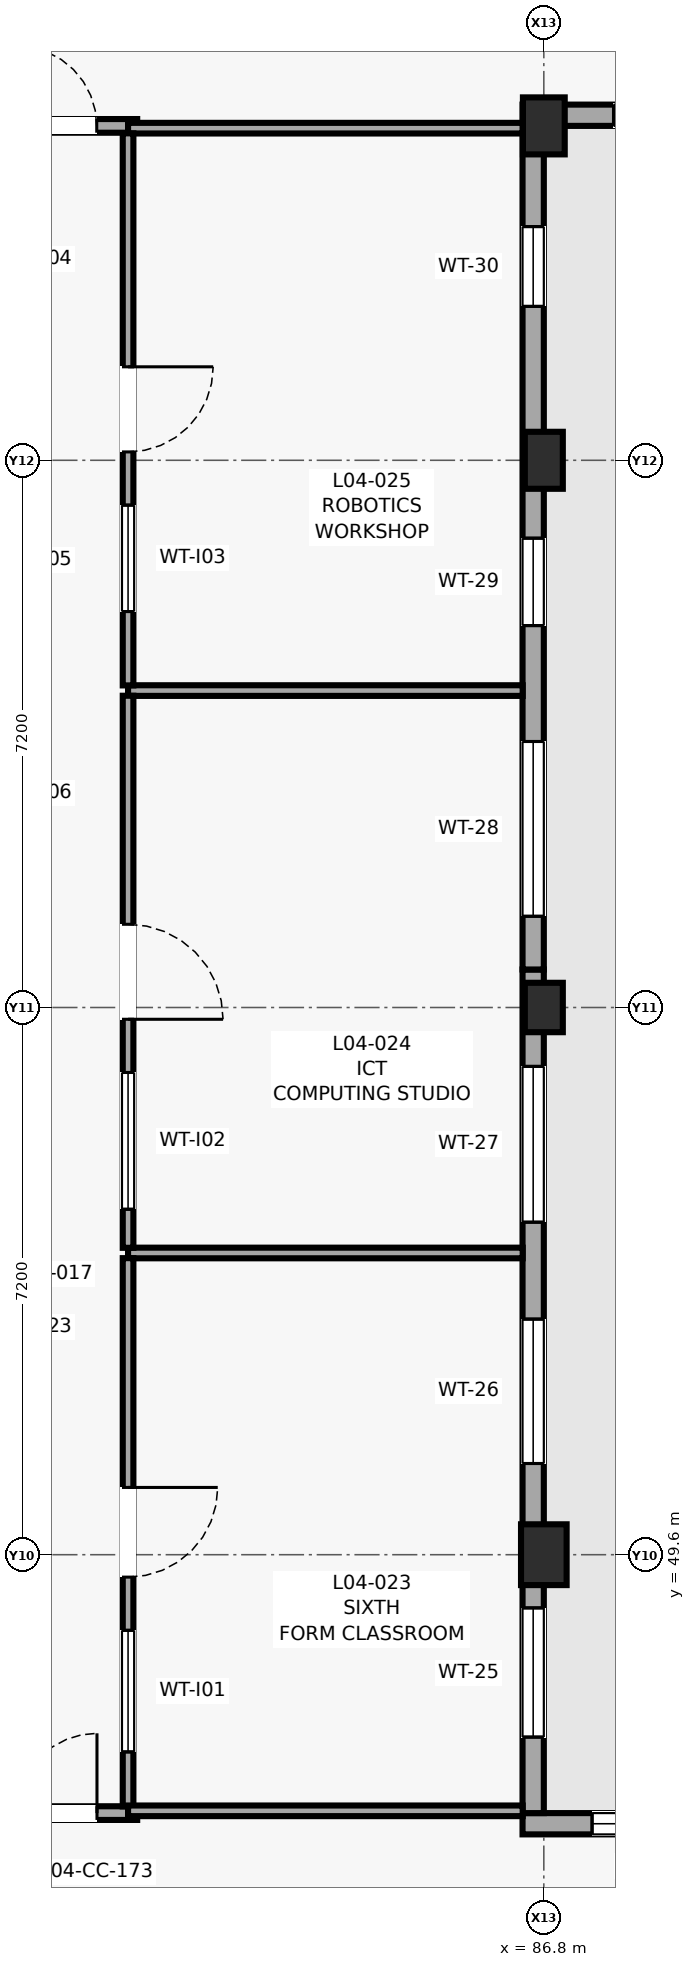
"""IFC4 building model, lengths in metres.
Left out: names, types, materials, properties, quantities, classifications, styles, units other than length and angle.
Written with IfcOpenShell. Run it as: python <this file> out.ifc"""

import sys

from ifc_helpers import new_model, si_unit, direction, frame, frame_2d, origin, origin_2d, place, context, subcontext, project, spatial, rectangle, extrude, element, fill, save


model = new_model("IFC4")
c1 = context("Model", 3, precision=1e-05, world=origin(), true_north=direction((0.0, 1.0)))
c2 = subcontext(c1, "Body", "Model", "MODEL_VIEW")
j1 = project(units=[si_unit("LENGTHUNIT", "METRE"), si_unit("PLANEANGLEUNIT", "RADIAN")], contexts=[c1])
p1 = place(None, origin())
s1 = spatial("IfcSite", under=j1, at=p1, CompositionType="ELEMENT")
p2 = place(p1, origin())
s2 = spatial("IfcBuilding", under=s1, at=p2, CompositionType="ELEMENT")
p3 = place(p2, frame((0.0, 0.0, 16.2)))
s3 = spatial("IfcBuildingStorey", under=s2, at=p3, CompositionType="ELEMENT", Elevation=16.2)
p4 = place(p3, frame((86.8, 49.6, 0.0), z_axis=(0.0, 0.0, 1.0), x_axis=(1.0, 0.0, 0.0)))
e1 = element("IfcColumn", 1, at=p4, inside=s3, PredefinedType="COLUMN", context=c2, shape_type="SweptSolid", body=[
    extrude(rectangle(XDim=0.6, YDim=0.8, at=origin_2d()), origin(), (0.0, 0.0, 1.0), 4.0),
])
p5 = place(p3, frame((86.8, 56.8, 0.0), z_axis=(0.0, 0.0, 1.0), x_axis=(1.0, 0.0, 0.0)))
e2 = element("IfcColumn", 2, at=p5, inside=s3, PredefinedType="COLUMN", context=c2, shape_type="SweptSolid", body=[
    extrude(rectangle(XDim=0.5, YDim=0.65, at=origin_2d()), origin(), (0.0, 0.0, 1.0), 4.0),
])
p6 = place(p3, frame((86.8, 64.0, 0.0), z_axis=(0.0, 0.0, 1.0), x_axis=(1.0, 0.0, 0.0)))
e3 = element("IfcColumn", 3, at=p6, inside=s3, PredefinedType="COLUMN", context=c2, shape_type="SweptSolid", body=[
    extrude(rectangle(XDim=0.5, YDim=0.75, at=origin_2d()), origin(), (0.0, 0.0, 1.0), 4.0),
])
p7 = place(p3, frame((86.8, 68.4, 0.0), z_axis=(0.0, 0.0, 1.0), x_axis=(1.0, 0.0, 0.0)))
e4 = element("IfcColumn", 4, at=p7, inside=s3, PredefinedType="COLUMN", context=c2, shape_type="SweptSolid", body=[
    extrude(rectangle(XDim=0.55, YDim=0.75, at=origin_2d()), origin(), (0.0, 0.0, 1.0), 4.0),
])
p8 = place(p3, frame((89.8, 46.06, 0.0), z_axis=(0.0, 0.0, 1.0), x_axis=(-1.0, 0.0, 0.0)))
e5 = element("IfcWall", 5, at=p8, inside=s3, PredefinedType="SOLIDWALL", context=c2, shape_type="SweptSolid", body=[
    extrude(rectangle(XDim=3.28, YDim=0.28, at=frame_2d((1.64, 0.0))), origin(), (0.0, 0.0, 1.0), 3.78),
])
p9 = place(p8, frame((0.915, 0.0, 0.85)))
e6 = element("IfcOpeningElement", 6, at=p9, cuts=e5, PredefinedType="OPENING", context=c2, shape_type="SweptSolid", body=[
    extrude(rectangle(XDim=1.45, YDim=1.7, at=frame_2d((0.725, 0.85))), frame((0.0, 0.15, 0.0), z_axis=(0.0, -1.0, 0.0), x_axis=(1.0, 0.0, 0.0)), (0.0, 0.0, 1.0), 0.3),
])
p10 = place(p3, frame((86.66, 46.2, 0.0), z_axis=(0.0, 0.0, 1.0), x_axis=(0.0, 1.0, 0.0)))
e7 = element("IfcWall", 7, at=p10, inside=s3, PredefinedType="SOLIDWALL", context=c2, shape_type="SweptSolid", body=[
    extrude(rectangle(XDim=11.1, YDim=0.28, at=frame_2d((5.55, 0.0))), origin(), (0.0, 0.0, 1.0), 3.175),
])
p11 = place(p10, frame((1.0, 0.0, 0.85)))
e8 = element("IfcOpeningElement", 8, at=p11, cuts=e7, PredefinedType="OPENING", context=c2, shape_type="SweptSolid", body=[
    extrude(rectangle(XDim=1.7, YDim=1.75, at=frame_2d((0.85, 0.875))), frame((0.0, 0.15, 0.0), z_axis=(0.0, -1.0, 0.0), x_axis=(1.0, 0.0, 0.0)), (0.0, 0.0, 1.0), 0.3),
])
p12 = place(p10, frame((4.6, 0.0, 0.85)))
e9 = element("IfcOpeningElement", 9, at=p12, cuts=e7, PredefinedType="OPENING", context=c2, shape_type="SweptSolid", body=[
    extrude(rectangle(XDim=1.9, YDim=1.65, at=frame_2d((0.95, 0.825))), frame((0.0, 0.15, 0.0), z_axis=(0.0, -1.0, 0.0), x_axis=(1.0, 0.0, 0.0)), (0.0, 0.0, 1.0), 0.3),
])
p13 = place(p10, frame((7.775, 0.0, 1.05)))
e10 = element("IfcOpeningElement", 10, at=p13, cuts=e7, PredefinedType="OPENING", context=c2, shape_type="SweptSolid", body=[
    extrude(rectangle(XDim=2.05, YDim=1.55, at=frame_2d((1.025, 0.775))), frame((0.0, 0.15, 0.0), z_axis=(0.0, -1.0, 0.0), x_axis=(1.0, 0.0, 0.0)), (0.0, 0.0, 1.0), 0.3),
])
p14 = place(p3, frame((86.66, 57.3, 0.0), z_axis=(0.0, 0.0, 1.0), x_axis=(0.0, 1.0, 0.0)))
e11 = element("IfcWall", 11, at=p14, inside=s3, PredefinedType="SOLIDWALL", context=c2, shape_type="SweptSolid", body=[
    extrude(rectangle(XDim=11.1, YDim=0.28, at=frame_2d((5.55, 0.0))), origin(), (0.0, 0.0, 1.0), 3.225),
])
p15 = place(p14, frame((0.7, 0.0, 1.05)))
e12 = element("IfcOpeningElement", 12, at=p15, cuts=e11, PredefinedType="OPENING", context=c2, shape_type="SweptSolid", body=[
    extrude(rectangle(XDim=2.3, YDim=1.45, at=frame_2d((1.15, 0.725))), frame((0.0, 0.15, 0.0), z_axis=(0.0, -1.0, 0.0), x_axis=(1.0, 0.0, 0.0)), (0.0, 0.0, 1.0), 0.3),
])
p16 = place(p14, frame((4.525, 0.0, 1.05)))
e13 = element("IfcOpeningElement", 13, at=p16, cuts=e11, PredefinedType="OPENING", context=c2, shape_type="SweptSolid", body=[
    extrude(rectangle(XDim=1.15, YDim=1.4, at=frame_2d((0.575, 0.7))), frame((0.0, 0.15, 0.0), z_axis=(0.0, -1.0, 0.0), x_axis=(1.0, 0.0, 0.0)), (0.0, 0.0, 1.0), 0.3),
])
p17 = place(p14, frame((8.725, 0.0, 1.05)))
e14 = element("IfcOpeningElement", 14, at=p17, cuts=e11, PredefinedType="OPENING", context=c2, shape_type="SweptSolid", body=[
    extrude(rectangle(XDim=1.05, YDim=1.3, at=frame_2d((0.525, 0.65))), frame((0.0, 0.15, 0.0), z_axis=(0.0, -1.0, 0.0), x_axis=(1.0, 0.0, 0.0)), (0.0, 0.0, 1.0), 0.3),
])
p18 = place(p3, frame((86.52, 68.54, 0.0), z_axis=(0.0, 0.0, 1.0), x_axis=(1.0, 0.0, 0.0)))
e15 = element("IfcWall", 15, at=p18, inside=s3, PredefinedType="SOLIDWALL", context=c2, shape_type="SweptSolid", body=[
    extrude(rectangle(XDim=11.98, YDim=0.28, at=frame_2d((5.99, 0.0))), origin(), (0.0, 0.0, 1.0), 3.78),
])
p19 = place(p18, frame((1.197, 0.0, 1.05)))
e16 = element("IfcOpeningElement", 16, at=p19, cuts=e15, PredefinedType="OPENING", context=c2, shape_type="SweptSolid", body=[
    extrude(rectangle(XDim=1.6, YDim=1.35, at=frame_2d((0.8, 0.675))), frame((0.0, 0.15, 0.0), z_axis=(0.0, -1.0, 0.0), x_axis=(1.0, 0.0, 0.0)), (0.0, 0.0, 1.0), 0.3),
])
p20 = place(p18, frame((4.89, 0.0, 1.05)))
e17 = element("IfcOpeningElement", 17, at=p20, cuts=e15, PredefinedType="OPENING", context=c2, shape_type="SweptSolid", body=[
    extrude(rectangle(XDim=2.2, YDim=1.35, at=frame_2d((1.1, 0.675))), frame((0.0, 0.15, 0.0), z_axis=(0.0, -1.0, 0.0), x_axis=(1.0, 0.0, 0.0)), (0.0, 0.0, 1.0), 0.3),
])
p21 = place(p18, frame((9.383, 0.0, 1.05)))
e18 = element("IfcOpeningElement", 18, at=p21, cuts=e15, PredefinedType="OPENING", context=c2, shape_type="SweptSolid", body=[
    extrude(rectangle(XDim=1.2, YDim=0.9, at=frame_2d((0.6, 0.45))), frame((0.0, 0.15, 0.0), z_axis=(0.0, -1.0, 0.0), x_axis=(1.0, 0.0, 0.0)), (0.0, 0.0, 1.0), 0.3),
])
p22 = place(p3, frame((79.341, 46.2, 0.0), z_axis=(0.0, 0.0, 1.0), x_axis=(1.0, 0.0, 0.0)))
e19 = element("IfcWall", 19, at=p22, inside=s3, PredefinedType="PARTITIONING", context=c2, shape_type="SweptSolid", body=[
    extrude(rectangle(XDim=2.109, YDim=0.18, at=frame_2d((1.054, 0.0))), origin(), (0.0, 0.0, 1.0), 3.78),
])
p23 = place(p22, frame((0.53, 0.0, 0.0)))
e20 = element("IfcOpeningElement", 20, at=p23, cuts=e19, PredefinedType="OPENING", context=c2, shape_type="SweptSolid", body=[
    extrude(rectangle(XDim=1.05, YDim=2.15, at=frame_2d((0.525, 1.075))), frame((0.0, 0.1, 0.0), z_axis=(0.0, -1.0, 0.0), x_axis=(1.0, 0.0, 0.0)), (0.0, 0.0, 1.0), 0.2),
])
p24 = place(p3, frame((79.336, 68.4, 0.0), z_axis=(0.0, 0.0, 1.0), x_axis=(1.0, 0.0, 0.0)))
e21 = element("IfcWall", 21, at=p24, inside=s3, PredefinedType="PARTITIONING", context=c2, shape_type="SweptSolid", body=[
    extrude(rectangle(XDim=2.114, YDim=0.18, at=frame_2d((1.057, 0.0))), origin(), (0.0, 0.0, 1.0), 3.025),
])
p25 = place(p24, frame((0.532, 0.0, 0.0)))
e22 = element("IfcOpeningElement", 22, at=p25, cuts=e21, PredefinedType="OPENING", context=c2, shape_type="SweptSolid", body=[
    extrude(rectangle(XDim=1.05, YDim=2.15, at=frame_2d((0.525, 1.075))), frame((0.0, 0.1, 0.0), z_axis=(0.0, -1.0, 0.0), x_axis=(1.0, 0.0, 0.0)), (0.0, 0.0, 1.0), 0.2),
])
p26 = place(p3, frame((86.522, 53.57, 0.0), z_axis=(0.0, 0.0, 1.0), x_axis=(-1.0, 0.0, 0.0)))
e23 = element("IfcWall", 23, at=p26, inside=s3, PredefinedType="PARTITIONING", context=c2, shape_type="SweptSolid", body=[
    extrude(rectangle(XDim=5.192, YDim=0.14, at=frame_2d((2.596, 0.0))), origin(), (0.0, 0.0, 1.0), 3.775),
])
p27 = place(p3, frame((81.33, 53.502, 0.0), z_axis=(0.0, 0.0, 1.0), x_axis=(0.0, -1.0, 0.0)))
e24 = element("IfcWall", 24, at=p27, inside=s3, PredefinedType="PARTITIONING", context=c2, shape_type="SweptSolid", body=[
    extrude(rectangle(XDim=7.214, YDim=0.14, at=frame_2d((3.607, 0.0))), origin(), (0.0, 0.0, 1.0), 3.775),
])
p28 = place(p27, frame((3.017, 0.0, 0.0)))
e25 = element("IfcOpeningElement", 25, at=p28, cuts=e24, PredefinedType="OPENING", context=c2, shape_type="SweptSolid", body=[
    extrude(rectangle(XDim=1.18, YDim=2.2, at=frame_2d((0.59, 1.1))), frame((0.0, 0.08, 0.0), z_axis=(0.0, -1.0, 0.0), x_axis=(1.0, 0.0, 0.0)), (0.0, 0.0, 1.0), 0.16),
])
p29 = place(p27, frame((4.897, 0.0, 1.05)))
e26 = element("IfcOpeningElement", 26, at=p29, cuts=e24, PredefinedType="OPENING", context=c2, shape_type="SweptSolid", body=[
    extrude(rectangle(XDim=1.6, YDim=1.1, at=frame_2d((0.8, 0.55))), frame((0.0, 0.08, 0.0), z_axis=(0.0, -1.0, 0.0), x_axis=(1.0, 0.0, 0.0)), (0.0, 0.0, 1.0), 0.16),
])
for number, where, z_axis, x_axis in (
    (27, (81.33, 46.23, 0.0), (0.0, 0.0, 1.0), (1.0, 0.0, 0.0)),
    (28, (86.522, 60.97, 0.0), (0.0, 0.0, 1.0), (-1.0, 0.0, 0.0)),
):
    element("IfcWall", number, at=place(p3, frame(where, z_axis=z_axis, x_axis=x_axis)), inside=s3, PredefinedType="PARTITIONING", context=c2, shape_type="SweptSolid", body=[
        extrude(rectangle(XDim=5.192, YDim=0.14, at=frame_2d((2.596, 0.0))), origin(), (0.0, 0.0, 1.0), 3.775),
    ])
p30 = place(p3, frame((81.33, 60.902, 0.0), z_axis=(0.0, 0.0, 1.0), x_axis=(0.0, -1.0, 0.0)))
e29 = element("IfcWall", 29, at=p30, inside=s3, PredefinedType="PARTITIONING", context=c2, shape_type="SweptSolid", body=[
    extrude(rectangle(XDim=7.264, YDim=0.14, at=frame_2d((3.632, 0.0))), origin(), (0.0, 0.0, 1.0), 3.775),
])
p31 = place(p30, frame((3.007, 0.0, 0.0)))
e30 = element("IfcOpeningElement", 30, at=p31, cuts=e29, PredefinedType="OPENING", context=c2, shape_type="SweptSolid", body=[
    extrude(rectangle(XDim=1.25, YDim=2.22, at=frame_2d((0.625, 1.11))), frame((0.0, 0.08, 0.0), z_axis=(0.0, -1.0, 0.0), x_axis=(1.0, 0.0, 0.0)), (0.0, 0.0, 1.0), 0.16),
])
p32 = place(p30, frame((4.957, 0.0, 1.05)))
e31 = element("IfcOpeningElement", 31, at=p32, cuts=e29, PredefinedType="OPENING", context=c2, shape_type="SweptSolid", body=[
    extrude(rectangle(XDim=1.8, YDim=1.2, at=frame_2d((0.9, 0.6))), frame((0.0, 0.08, 0.0), z_axis=(0.0, -1.0, 0.0), x_axis=(1.0, 0.0, 0.0)), (0.0, 0.0, 1.0), 0.16),
])
p33 = place(p3, frame((86.522, 68.37, 0.0), z_axis=(0.0, 0.0, 1.0), x_axis=(-1.0, 0.0, 0.0)))
e32 = element("IfcWall", 32, at=p33, inside=s3, PredefinedType="PARTITIONING", context=c2, shape_type="SweptSolid", body=[
    extrude(rectangle(XDim=5.192, YDim=0.14, at=frame_2d((2.596, 0.0))), origin(), (0.0, 0.0, 1.0), 3.025),
])
p34 = place(p3, frame((81.33, 68.302, 0.0), z_axis=(0.0, 0.0, 1.0), x_axis=(0.0, -1.0, 0.0)))
e33 = element("IfcWall", 33, at=p34, inside=s3, PredefinedType="PARTITIONING", context=c2, shape_type="SweptSolid", body=[
    extrude(rectangle(XDim=7.264, YDim=0.14, at=frame_2d((3.632, 0.0))), origin(), (0.0, 0.0, 1.0), 3.775),
])
p35 = place(p34, frame((3.072, 0.0, 0.0)))
e34 = element("IfcOpeningElement", 34, at=p35, cuts=e33, PredefinedType="OPENING", context=c2, shape_type="SweptSolid", body=[
    extrude(rectangle(XDim=1.12, YDim=2.18, at=frame_2d((0.56, 1.09))), frame((0.0, 0.08, 0.0), z_axis=(0.0, -1.0, 0.0), x_axis=(1.0, 0.0, 0.0)), (0.0, 0.0, 1.0), 0.16),
])
p36 = place(p34, frame((4.892, 0.0, 1.05)))
e35 = element("IfcOpeningElement", 35, at=p36, cuts=e33, PredefinedType="OPENING", context=c2, shape_type="SweptSolid", body=[
    extrude(rectangle(XDim=1.4, YDim=1.05, at=frame_2d((0.7, 0.525))), frame((0.0, 0.08, 0.0), z_axis=(0.0, -1.0, 0.0), x_axis=(1.0, 0.0, 0.0)), (0.0, 0.0, 1.0), 0.16),
])
p37 = place(p9, origin())
e36 = element("IfcWindow", 36, at=p37, inside=s3, PartitioningType="SINGLE_PANEL", PredefinedType="WINDOW", context=c2, shape_type="SweptSolid", body=[
    extrude(rectangle(XDim=1.45, YDim=1.7, at=frame_2d((0.725, 0.85))), frame((0.0, 0.03, 0.0), z_axis=(0.0, -1.0, 0.0), x_axis=(1.0, 0.0, 0.0)), (0.0, 0.0, 1.0), 0.06),
])
fill(e6, e36)
p38 = place(p11, origin())
e37 = element("IfcWindow", 37, at=p38, inside=s3, PartitioningType="SINGLE_PANEL", PredefinedType="WINDOW", context=c2, shape_type="SweptSolid", body=[
    extrude(rectangle(XDim=1.7, YDim=1.75, at=frame_2d((0.85, 0.875))), frame((0.0, 0.03, 0.0), z_axis=(0.0, -1.0, 0.0), x_axis=(1.0, 0.0, 0.0)), (0.0, 0.0, 1.0), 0.06),
])
fill(e8, e37)
p39 = place(p12, origin())
e38 = element("IfcWindow", 38, at=p39, inside=s3, PartitioningType="SINGLE_PANEL", PredefinedType="WINDOW", context=c2, shape_type="SweptSolid", body=[
    extrude(rectangle(XDim=1.9, YDim=1.65, at=frame_2d((0.95, 0.825))), frame((0.0, 0.03, 0.0), z_axis=(0.0, -1.0, 0.0), x_axis=(1.0, 0.0, 0.0)), (0.0, 0.0, 1.0), 0.06),
])
fill(e9, e38)
p40 = place(p13, origin())
e39 = element("IfcWindow", 39, at=p40, inside=s3, PartitioningType="SINGLE_PANEL", PredefinedType="WINDOW", context=c2, shape_type="SweptSolid", body=[
    extrude(rectangle(XDim=2.05, YDim=1.55, at=frame_2d((1.025, 0.775))), frame((0.0, 0.03, 0.0), z_axis=(0.0, -1.0, 0.0), x_axis=(1.0, 0.0, 0.0)), (0.0, 0.0, 1.0), 0.06),
])
fill(e10, e39)
p41 = place(p15, origin())
e40 = element("IfcWindow", 40, at=p41, inside=s3, PartitioningType="SINGLE_PANEL", PredefinedType="WINDOW", context=c2, shape_type="SweptSolid", body=[
    extrude(rectangle(XDim=2.3, YDim=1.45, at=frame_2d((1.15, 0.725))), frame((0.0, 0.03, 0.0), z_axis=(0.0, -1.0, 0.0), x_axis=(1.0, 0.0, 0.0)), (0.0, 0.0, 1.0), 0.06),
])
fill(e12, e40)
p42 = place(p16, origin())
e41 = element("IfcWindow", 41, at=p42, inside=s3, PartitioningType="SINGLE_PANEL", PredefinedType="WINDOW", context=c2, shape_type="SweptSolid", body=[
    extrude(rectangle(XDim=1.15, YDim=1.4, at=frame_2d((0.575, 0.7))), frame((0.0, 0.03, 0.0), z_axis=(0.0, -1.0, 0.0), x_axis=(1.0, 0.0, 0.0)), (0.0, 0.0, 1.0), 0.06),
])
fill(e13, e41)
p43 = place(p17, origin())
e42 = element("IfcWindow", 42, at=p43, inside=s3, PartitioningType="SINGLE_PANEL", PredefinedType="WINDOW", context=c2, shape_type="SweptSolid", body=[
    extrude(rectangle(XDim=1.05, YDim=1.3, at=frame_2d((0.525, 0.65))), frame((0.0, 0.03, 0.0), z_axis=(0.0, -1.0, 0.0), x_axis=(1.0, 0.0, 0.0)), (0.0, 0.0, 1.0), 0.06),
])
fill(e14, e42)
p44 = place(p19, origin())
e43 = element("IfcWindow", 43, at=p44, inside=s3, PartitioningType="SINGLE_PANEL", PredefinedType="WINDOW", context=c2, shape_type="SweptSolid", body=[
    extrude(rectangle(XDim=1.6, YDim=1.35, at=frame_2d((0.8, 0.675))), frame((0.0, 0.03, 0.0), z_axis=(0.0, -1.0, 0.0), x_axis=(1.0, 0.0, 0.0)), (0.0, 0.0, 1.0), 0.06),
])
fill(e16, e43)
p45 = place(p23, origin())
e44 = element("IfcDoor", 44, at=p45, inside=s3, OperationType="SINGLE_SWING_RIGHT", PredefinedType="DOOR", context=c2, shape_type="SweptSolid", body=[
    extrude(rectangle(XDim=1.05, YDim=2.15, at=frame_2d((0.525, 1.075))), frame((0.0, 0.025, 0.0), z_axis=(0.0, -1.0, 0.0), x_axis=(1.0, 0.0, 0.0)), (0.0, 0.0, 1.0), 0.05),
])
fill(e20, e44)
p46 = place(p25, origin())
e45 = element("IfcDoor", 45, at=p46, inside=s3, OperationType="SINGLE_SWING_LEFT", PredefinedType="DOOR", context=c2, shape_type="SweptSolid", body=[
    extrude(rectangle(XDim=1.05, YDim=2.15, at=frame_2d((0.525, 1.075))), frame((0.0, 0.025, 0.0), z_axis=(0.0, -1.0, 0.0), x_axis=(1.0, 0.0, 0.0)), (0.0, 0.0, 1.0), 0.05),
])
fill(e22, e45)
p47 = place(p28, origin())
e46 = element("IfcDoor", 46, at=p47, inside=s3, OperationType="SINGLE_SWING_LEFT", PredefinedType="DOOR", context=c2, shape_type="SweptSolid", body=[
    extrude(rectangle(XDim=1.18, YDim=2.2, at=frame_2d((0.59, 1.1))), frame((0.0, 0.025, 0.0), z_axis=(0.0, -1.0, 0.0), x_axis=(1.0, 0.0, 0.0)), (0.0, 0.0, 1.0), 0.05),
])
fill(e25, e46)
p48 = place(p29, origin())
e47 = element("IfcWindow", 47, at=p48, inside=s3, PartitioningType="SINGLE_PANEL", PredefinedType="WINDOW", context=c2, shape_type="SweptSolid", body=[
    extrude(rectangle(XDim=1.6, YDim=1.1, at=frame_2d((0.8, 0.55))), frame((0.0, 0.03, 0.0), z_axis=(0.0, -1.0, 0.0), x_axis=(1.0, 0.0, 0.0)), (0.0, 0.0, 1.0), 0.06),
])
fill(e26, e47)
p49 = place(p31, origin())
e48 = element("IfcDoor", 48, at=p49, inside=s3, OperationType="SINGLE_SWING_RIGHT", PredefinedType="DOOR", context=c2, shape_type="SweptSolid", body=[
    extrude(rectangle(XDim=1.25, YDim=2.22, at=frame_2d((0.625, 1.11))), frame((0.0, 0.025, 0.0), z_axis=(0.0, -1.0, 0.0), x_axis=(1.0, 0.0, 0.0)), (0.0, 0.0, 1.0), 0.05),
])
fill(e30, e48)
p50 = place(p32, origin())
e49 = element("IfcWindow", 49, at=p50, inside=s3, PartitioningType="SINGLE_PANEL", PredefinedType="WINDOW", context=c2, shape_type="SweptSolid", body=[
    extrude(rectangle(XDim=1.8, YDim=1.2, at=frame_2d((0.9, 0.6))), frame((0.0, 0.03, 0.0), z_axis=(0.0, -1.0, 0.0), x_axis=(1.0, 0.0, 0.0)), (0.0, 0.0, 1.0), 0.06),
])
fill(e31, e49)
p51 = place(p35, origin())
e50 = element("IfcDoor", 50, at=p51, inside=s3, OperationType="SINGLE_SWING_LEFT", PredefinedType="DOOR", context=c2, shape_type="SweptSolid", body=[
    extrude(rectangle(XDim=1.12, YDim=2.18, at=frame_2d((0.56, 1.09))), frame((0.0, 0.025, 0.0), z_axis=(0.0, -1.0, 0.0), x_axis=(1.0, 0.0, 0.0)), (0.0, 0.0, 1.0), 0.05),
])
fill(e34, e50)
p52 = place(p36, origin())
e51 = element("IfcWindow", 51, at=p52, inside=s3, PartitioningType="SINGLE_PANEL", PredefinedType="WINDOW", context=c2, shape_type="SweptSolid", body=[
    extrude(rectangle(XDim=1.4, YDim=1.05, at=frame_2d((0.7, 0.525))), frame((0.0, 0.03, 0.0), z_axis=(0.0, -1.0, 0.0), x_axis=(1.0, 0.0, 0.0)), (0.0, 0.0, 1.0), 0.06),
])
fill(e35, e51)
save(model, sys.argv[1])
